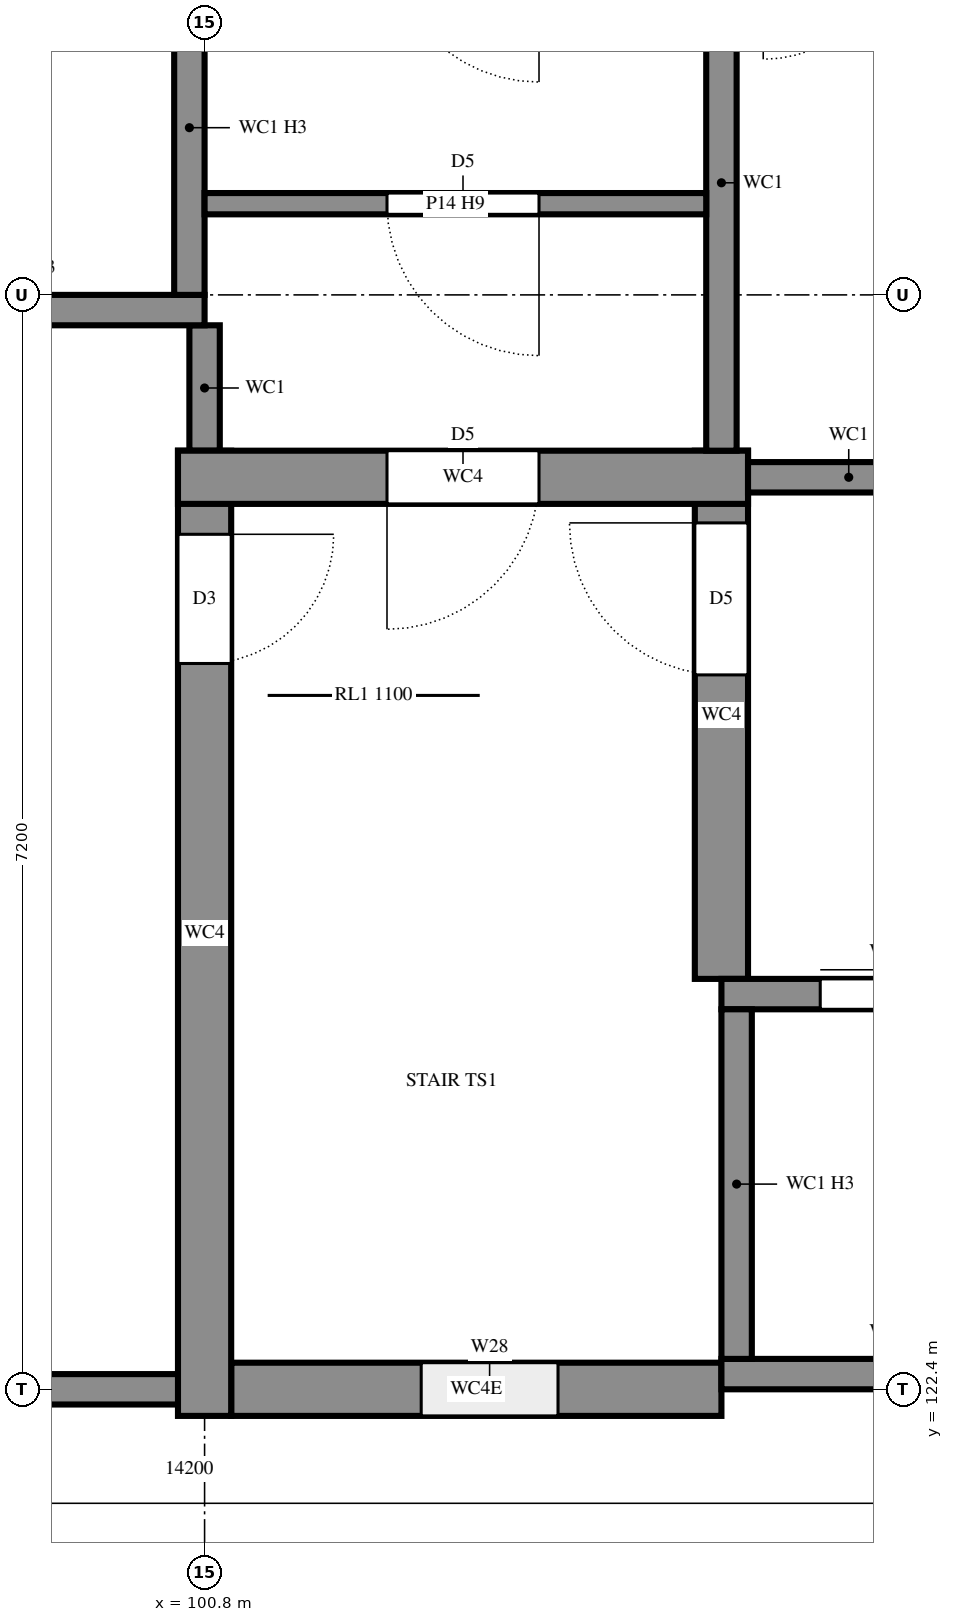
"""IFC4 building model, lengths in metres.
Left out: names, types, materials, properties, quantities, classifications, styles, units other than length and angle.
Written with IfcOpenShell. Run it as: python <this file> out.ifc"""

import sys

from ifc_helpers import new_model, si_unit, direction, frame, frame_2d, origin, place, context, subcontext, project, spatial, rectangle, extrude, element, fill, save


model = new_model("IFC4")
c1 = context("Model", 3, precision=1e-05, world=origin(), true_north=direction((0.0, 1.0)))
c2 = subcontext(c1, "Body", "Model", "MODEL_VIEW")
j1 = project(units=[si_unit("LENGTHUNIT", "METRE"), si_unit("PLANEANGLEUNIT", "RADIAN")], contexts=[c1])
p1 = place(None, origin())
s1 = spatial("IfcSite", under=j1, at=p1, CompositionType="ELEMENT")
p2 = place(p1, origin())
s2 = spatial("IfcBuilding", under=s1, at=p2, CompositionType="ELEMENT")
p3 = place(p2, frame((0.0, 0.0, 25.2)))
s3 = spatial("IfcBuildingStorey", under=s2, at=p3, CompositionType="ELEMENT", Elevation=25.2)
p4 = place(p3, frame((93.4, 122.4, 0.0), z_axis=(0.0, 0.0, 1.0), x_axis=(1.0, 0.0, 0.0)))
e1 = element("IfcWall", 1, at=p4, inside=s3, PredefinedType="SHEAR", context=c2, shape_type="SweptSolid", body=[
    extrude(rectangle(XDim=7.575, YDim=0.2, at=frame_2d((3.788, 0.0))), origin(), (0.0, 0.0, 1.0), 3.6),
])
p5 = place(p3, frame((100.975, 122.4, 0.0), z_axis=(0.0, 0.0, 1.0), x_axis=(1.0, 0.0, 0.0)))
e2 = element("IfcWall", 2, at=p5, inside=s3, PredefinedType="SHEAR", context=c2, shape_type="SweptSolid", body=[
    extrude(rectangle(XDim=3.225, YDim=0.35, at=frame_2d((1.612, 0.0))), origin(), (0.0, 0.0, 1.0), 3.6),
])
p6 = place(p5, frame((1.25, 0.0, 0.6)))
e3 = element("IfcOpeningElement", 3, at=p6, cuts=e2, PredefinedType="OPENING", context=c2, shape_type="SweptSolid", body=[
    extrude(rectangle(XDim=0.9, YDim=2.1, at=frame_2d((0.45, 1.05))), frame((0.0, 0.185, 0.0), z_axis=(0.0, -1.0, 0.0), x_axis=(1.0, 0.0, 0.0)), (0.0, 0.0, 1.0), 0.37),
])
p7 = place(p3, frame((104.2, 125.1, 0.0), z_axis=(0.0, 0.0, 1.0), x_axis=(0.0, 1.0, 0.0)))
e4 = element("IfcWall", 4, at=p7, inside=s3, PredefinedType="SHEAR", context=c2, shape_type="SweptSolid", body=[
    extrude(rectangle(XDim=3.475, YDim=0.35, at=frame_2d((1.737, 0.0))), origin(), (0.0, 0.0, 1.0), 3.6),
])
p8 = place(p7, frame((2.0, 0.0, 0.0)))
e5 = element("IfcOpeningElement", 5, at=p8, cuts=e4, PredefinedType="OPENING", context=c2, shape_type="SweptSolid", body=[
    extrude(rectangle(XDim=1.0, YDim=2.1, at=frame_2d((0.5, 1.05))), frame((0.0, 0.185, 0.0), z_axis=(0.0, -1.0, 0.0), x_axis=(1.0, 0.0, 0.0)), (0.0, 0.0, 1.0), 0.37),
])
p9 = place(p3, frame((100.8, 128.575, 0.0), z_axis=(0.0, 0.0, 1.0), x_axis=(0.0, -1.0, 0.0)))
e6 = element("IfcWall", 6, at=p9, inside=s3, PredefinedType="SHEAR", context=c2, shape_type="SweptSolid", body=[
    extrude(rectangle(XDim=6.35, YDim=0.35, at=frame_2d((3.175, 0.0))), origin(), (0.0, 0.0, 1.0), 3.6),
])
p10 = place(p9, frame((0.55, 0.0, 0.0)))
e7 = element("IfcOpeningElement", 7, at=p10, cuts=e6, PredefinedType="OPENING", context=c2, shape_type="SweptSolid", body=[
    extrude(rectangle(XDim=0.85, YDim=2.1, at=frame_2d((0.425, 1.05))), frame((0.0, 0.185, 0.0), z_axis=(0.0, -1.0, 0.0), x_axis=(1.0, 0.0, 0.0)), (0.0, 0.0, 1.0), 0.37),
])
p11 = place(p3, frame((100.8, 128.575, 0.0), z_axis=(0.0, 0.0, 1.0), x_axis=(0.0, 1.0, 0.0)))
e8 = element("IfcWall", 8, at=p11, inside=s3, PredefinedType="SHEAR", context=c2, shape_type="SweptSolid", body=[
    extrude(rectangle(XDim=0.825, YDim=0.2, at=frame_2d((0.413, 0.0))), origin(), (0.0, 0.0, 1.0), 3.6),
])
p12 = place(p3, frame((104.375, 128.4, 0.0), z_axis=(0.0, 0.0, 1.0), x_axis=(-1.0, 0.0, 0.0)))
e9 = element("IfcWall", 9, at=p12, inside=s3, PredefinedType="SHEAR", context=c2, shape_type="SweptSolid", body=[
    extrude(rectangle(XDim=3.75, YDim=0.35, at=frame_2d((1.875, 0.0))), origin(), (0.0, 0.0, 1.0), 3.6),
])
p13 = place(p12, frame((1.375, 0.0, 0.0)))
e10 = element("IfcOpeningElement", 10, at=p13, cuts=e9, PredefinedType="OPENING", context=c2, shape_type="SweptSolid", body=[
    extrude(rectangle(XDim=1.0, YDim=2.1, at=frame_2d((0.5, 1.05))), frame((0.0, 0.185, 0.0), z_axis=(0.0, -1.0, 0.0), x_axis=(1.0, 0.0, 0.0)), (0.0, 0.0, 1.0), 0.37),
])
p14 = place(p3, frame((104.375, 128.4, 0.0), z_axis=(0.0, 0.0, 1.0), x_axis=(1.0, 0.0, 0.0)))
e11 = element("IfcWall", 11, at=p14, inside=s3, PredefinedType="SHEAR", context=c2, shape_type="SweptSolid", body=[
    extrude(rectangle(XDim=1.325, YDim=0.2, at=frame_2d((0.663, 0.0))), origin(), (0.0, 0.0, 1.0), 3.6),
])
p15 = place(p3, frame((104.2, 132.1, 0.0), z_axis=(0.0, 0.0, 1.0), x_axis=(0.0, -1.0, 0.0)))
e12 = element("IfcWall", 12, at=p15, inside=s3, PredefinedType="SHEAR", context=c2, shape_type="SweptSolid", body=[
    extrude(rectangle(XDim=3.525, YDim=0.2, at=frame_2d((1.763, 0.0))), origin(), (0.0, 0.0, 1.0), 3.6),
])
p16 = place(p3, frame((98.4, 129.5, 0.0), z_axis=(0.0, 0.0, 1.0), x_axis=(1.0, 0.0, 0.0)))
e13 = element("IfcWall", 13, at=p16, inside=s3, PredefinedType="SHEAR", context=c2, shape_type="SweptSolid", body=[
    extrude(rectangle(XDim=2.4, YDim=0.2, at=frame_2d((1.2, 0.0))), origin(), (0.0, 0.0, 1.0), 4.5),
])
p17 = place(p3, frame((100.7, 129.6, 0.0), z_axis=(0.0, 0.0, 1.0), x_axis=(0.0, 1.0, 0.0)))
e14 = element("IfcWall", 14, at=p17, inside=s3, PredefinedType="SHEAR", context=c2, shape_type="SweptSolid", body=[
    extrude(rectangle(XDim=2.2, YDim=0.2, at=frame_2d((1.1, 0.0))), origin(), (0.0, 0.0, 1.0), 4.5),
])
p18 = place(p3, frame((104.2, 122.5, 0.0), z_axis=(0.0, 0.0, 1.0), x_axis=(1.0, 0.0, 0.0)))
e15 = element("IfcWall", 15, at=p18, inside=s3, PredefinedType="SHEAR", context=c2, shape_type="SweptSolid", body=[
    extrude(rectangle(XDim=2.4, YDim=0.2, at=frame_2d((1.2, 0.0))), origin(), (0.0, 0.0, 1.0), 4.5),
])
p19 = place(p3, frame((104.2, 125.0, 0.0), z_axis=(0.0, 0.0, 1.0), x_axis=(1.0, 0.0, 0.0)))
e16 = element("IfcWall", 16, at=p19, inside=s3, PredefinedType="SHEAR", context=c2, shape_type="SweptSolid", body=[
    extrude(rectangle(XDim=2.4, YDim=0.2, at=frame_2d((1.2, 0.0))), origin(), (0.0, 0.0, 1.0), 4.5),
])
p20 = place(p19, frame((0.65, 0.0, 0.0)))
e17 = element("IfcOpeningElement", 17, at=p20, cuts=e16, PredefinedType="OPENING", context=c2, shape_type="SweptSolid", body=[
    extrude(rectangle(XDim=1.1, YDim=2.1, at=frame_2d((0.55, 1.05))), frame((0.0, 0.11, 0.0), z_axis=(0.0, -1.0, 0.0), x_axis=(1.0, 0.0, 0.0)), (0.0, 0.0, 1.0), 0.22),
])
p21 = place(p3, frame((104.3, 122.6, 0.0), z_axis=(0.0, 0.0, 1.0), x_axis=(0.0, 1.0, 0.0)))
e18 = element("IfcWall", 18, at=p21, inside=s3, PredefinedType="SHEAR", context=c2, shape_type="SweptSolid", body=[
    extrude(rectangle(XDim=2.3, YDim=0.2, at=frame_2d((1.15, 0.0))), origin(), (0.0, 0.0, 1.0), 4.5),
])
p22 = place(p3, frame((100.8, 130.2, 0.0), z_axis=(0.0, 0.0, 1.0), x_axis=(1.0, 0.0, 0.0)))
e19 = element("IfcWall", 19, at=p22, inside=s3, PredefinedType="PARTITIONING", context=c2, shape_type="SweptSolid", body=[
    extrude(rectangle(XDim=3.3, YDim=0.14, at=frame_2d((1.65, 0.0))), origin(), (0.0, 0.0, 1.0), 3.29),
])
p23 = place(p22, frame((1.2, 0.0, 0.0)))
e20 = element("IfcOpeningElement", 20, at=p23, cuts=e19, PredefinedType="OPENING", context=c2, shape_type="SweptSolid", body=[
    extrude(rectangle(XDim=1.0, YDim=2.1, at=frame_2d((0.5, 1.05))), frame((0.0, 0.08, 0.0), z_axis=(0.0, -1.0, 0.0), x_axis=(1.0, 0.0, 0.0)), (0.0, 0.0, 1.0), 0.16),
])
p24 = place(p6, origin())
e21 = element("IfcWindow", 21, at=p24, inside=s3, PartitioningType="SINGLE_PANEL", PredefinedType="WINDOW", context=c2, shape_type="SweptSolid", body=[
    extrude(rectangle(XDim=0.9, YDim=2.1, at=frame_2d((0.45, 1.05))), frame((0.0, 0.03, 0.0), z_axis=(0.0, -1.0, 0.0), x_axis=(1.0, 0.0, 0.0)), (0.0, 0.0, 1.0), 0.06),
])
fill(e3, e21)
p25 = place(p20, origin())
e22 = element("IfcDoor", 22, at=p25, inside=s3, OperationType="SLIDING_TO_LEFT", PredefinedType="DOOR", context=c2, shape_type="SweptSolid", body=[
    extrude(rectangle(XDim=1.1, YDim=2.1, at=frame_2d((0.55, 1.05))), frame((0.0, 0.025, 0.0), z_axis=(0.0, -1.0, 0.0), x_axis=(1.0, 0.0, 0.0)), (0.0, 0.0, 1.0), 0.05),
])
fill(e17, e22)
p26 = place(p23, frame((1.0, 0.0, 0.0), z_axis=(0.0, 0.0, 1.0), x_axis=(-1.0, 0.0, 0.0)))
e23 = element("IfcDoor", 23, at=p26, inside=s3, OperationType="SINGLE_SWING_RIGHT", PredefinedType="DOOR", context=c2, shape_type="SweptSolid", body=[
    extrude(rectangle(XDim=1.0, YDim=2.1, at=frame_2d((0.5, 1.05))), frame((0.0, 0.025, 0.0), z_axis=(0.0, -1.0, 0.0), x_axis=(1.0, 0.0, 0.0)), (0.0, 0.0, 1.0), 0.05),
])
fill(e20, e23)
p27 = place(p13, origin())
e24 = element("IfcDoor", 24, at=p27, inside=s3, OperationType="SINGLE_SWING_LEFT", PredefinedType="DOOR", context=c2, shape_type="SweptSolid", body=[
    extrude(rectangle(XDim=1.0, YDim=2.1, at=frame_2d((0.5, 1.05))), frame((0.0, 0.025, 0.0), z_axis=(0.0, -1.0, 0.0), x_axis=(1.0, 0.0, 0.0)), (0.0, 0.0, 1.0), 0.05),
])
fill(e10, e24)
p28 = place(p10, origin())
e25 = element("IfcDoor", 25, at=p28, inside=s3, OperationType="SINGLE_SWING_RIGHT", PredefinedType="DOOR", context=c2, shape_type="SweptSolid", body=[
    extrude(rectangle(XDim=0.85, YDim=2.1, at=frame_2d((0.425, 1.05))), frame((0.0, 0.025, 0.0), z_axis=(0.0, -1.0, 0.0), x_axis=(1.0, 0.0, 0.0)), (0.0, 0.0, 1.0), 0.05),
])
fill(e7, e25)
p29 = place(p8, origin())
e26 = element("IfcDoor", 26, at=p29, inside=s3, OperationType="SINGLE_SWING_LEFT", PredefinedType="DOOR", context=c2, shape_type="SweptSolid", body=[
    extrude(rectangle(XDim=1.0, YDim=2.1, at=frame_2d((0.5, 1.05))), frame((0.0, 0.025, 0.0), z_axis=(0.0, -1.0, 0.0), x_axis=(1.0, 0.0, 0.0)), (0.0, 0.0, 1.0), 0.05),
])
fill(e5, e26)
save(model, sys.argv[1])
